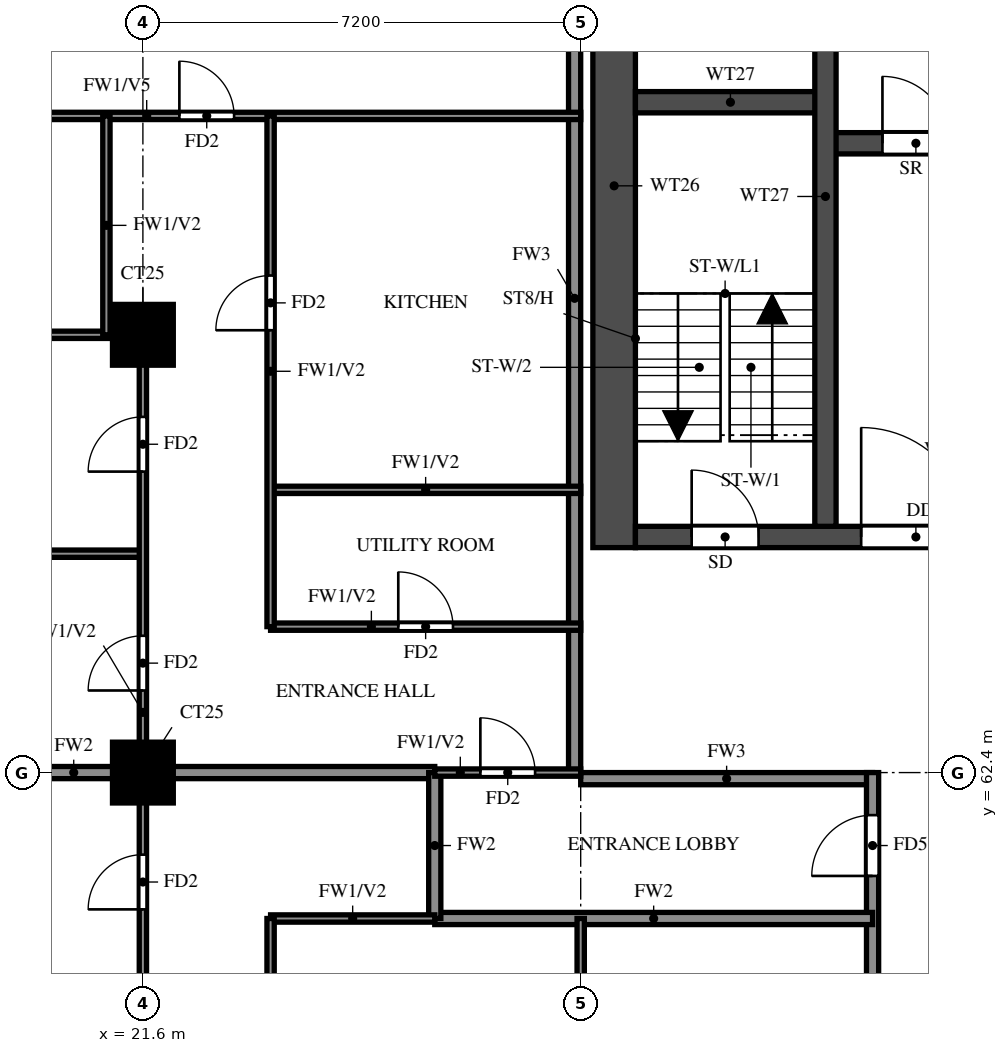
"""IFC4 building model, lengths in metres.
Left out: names, types, materials, properties, quantities, classifications, styles, units other than length and angle.
Written with IfcOpenShell. Run it as: python <this file> out.ifc"""

import sys

from ifc_helpers import new_model, si_unit, direction, frame, frame_2d, origin, origin_2d, place, context, subcontext, project, spatial, rectangle, extrude, source, transform, mapped, element, fill, save


model = new_model("IFC4")
c1 = context("Model", 3, precision=1e-05, world=origin(), true_north=direction((0.0, 1.0)))
c2 = subcontext(c1, "Body", "Model", "MODEL_VIEW")
j1 = project(units=[si_unit("LENGTHUNIT", "METRE"), si_unit("PLANEANGLEUNIT", "RADIAN")], contexts=[c1])
p1 = place(None, origin())
s1 = spatial("IfcSite", under=j1, at=p1, CompositionType="ELEMENT")
p2 = place(p1, origin())
s2 = spatial("IfcBuilding", under=s1, at=p2, CompositionType="ELEMENT")
p3 = place(p2, frame((0.0, 0.0, 143.0)))
s3 = spatial("IfcBuildingStorey", under=s2, at=p3, CompositionType="ELEMENT", Elevation=143.0)
m1 = source(origin(), c2, "Body", "SweptSolid", [
    extrude(rectangle(XDim=1.0, YDim=1.0, at=origin_2d()), origin(), (0.0, 0.0, 1.0), 3.2),
])
for number, where, z_axis, x_axis in (
    (1, (21.6, 62.4, 0.0), (0.0, 0.0, 1.0), (1.0, 0.0, 0.0)),
    (2, (21.6, 69.6, 0.0), (0.0, 0.0, 1.0), (1.0, 0.0, 0.0)),
):
    element("IfcColumn", number, at=place(p3, frame(where, z_axis=z_axis, x_axis=x_axis)), inside=s3, PredefinedType="COLUMN", context=c2, shape_type="MappedRepresentation", body=[
        mapped(m1, transform((0.0, 0.0, 0.0))),
    ])
p4 = place(p3, frame((29.35, 66.1, 0.0), z_axis=(0.0, 0.0, 1.0), x_axis=(0.0, 1.0, 0.0)))
e3 = element("IfcWall", 3, at=p4, inside=s3, PredefinedType="SHEAR", context=c2, shape_type="SweptSolid", body=[
    extrude(rectangle(XDim=11.9, YDim=0.7, at=frame_2d((5.95, 0.0))), origin(), (0.0, 0.0, 1.0), 3.2),
])
p5 = place(p3, frame((29.7, 66.275, 0.0), z_axis=(0.0, 0.0, 1.0), x_axis=(1.0, 0.0, 0.0)))
e4 = element("IfcWall", 4, at=p5, inside=s3, PredefinedType="SHEAR", context=c2, shape_type="SweptSolid", body=[
    extrude(rectangle(XDim=41.4, YDim=0.35, at=frame_2d((20.7, 0.0))), origin(), (0.0, 0.0, 1.0), 3.2),
])
p6 = place(p5, frame((0.925, 0.0, 0.0)))
e5 = element("IfcOpeningElement", 5, at=p6, cuts=e4, PredefinedType="OPENING", context=c2, shape_type="SweptSolid", body=[
    extrude(rectangle(XDim=1.1, YDim=2.1, at=frame_2d((0.55, 1.05))), frame((0.0, 0.185, 0.0), z_axis=(0.0, -1.0, 0.0), x_axis=(1.0, 0.0, 0.0)), (0.0, 0.0, 1.0), 0.37),
])
p7 = place(p5, frame((3.712, 0.0, 0.0)))
e6 = element("IfcOpeningElement", 6, at=p7, cuts=e4, PredefinedType="OPENING", context=c2, shape_type="SweptSolid", body=[
    extrude(rectangle(XDim=1.8, YDim=2.1, at=frame_2d((0.9, 1.05))), frame((0.0, 0.185, 0.0), z_axis=(0.0, -1.0, 0.0), x_axis=(1.0, 0.0, 0.0)), (0.0, 0.0, 1.0), 0.37),
])
p8 = place(p3, frame((32.825, 72.75, 0.0), z_axis=(0.0, 0.0, 1.0), x_axis=(1.0, 0.0, 0.0)))
e7 = element("IfcWall", 7, at=p8, inside=s3, PredefinedType="SHEAR", context=c2, shape_type="SweptSolid", body=[
    extrude(rectangle(XDim=35.15, YDim=0.35, at=frame_2d((17.575, 0.0))), origin(), (0.0, 0.0, 1.0), 3.2),
])
p9 = place(p8, frame((19.8, 0.0, 0.0)))
e8 = element("IfcOpeningElement", 8, at=p9, cuts=e7, PredefinedType="OPENING", context=c2, shape_type="SweptSolid", body=[
    extrude(rectangle(XDim=1.1, YDim=2.1, at=frame_2d((0.55, 1.05))), frame((0.0, 0.185, 0.0), z_axis=(0.0, -1.0, 0.0), x_axis=(1.0, 0.0, 0.0)), (0.0, 0.0, 1.0), 0.37),
])
p10 = place(p8, frame((27.7, 0.0, 0.0)))
e9 = element("IfcOpeningElement", 9, at=p10, cuts=e7, PredefinedType="OPENING", context=c2, shape_type="SweptSolid", body=[
    extrude(rectangle(XDim=1.1, YDim=2.1, at=frame_2d((0.55, 1.05))), frame((0.0, 0.185, 0.0), z_axis=(0.0, -1.0, 0.0), x_axis=(1.0, 0.0, 0.0)), (0.0, 0.0, 1.0), 0.37),
])
p11 = place(p8, frame((30.3, 0.0, 0.0)))
e10 = element("IfcOpeningElement", 10, at=p11, cuts=e7, PredefinedType="OPENING", context=c2, shape_type="SweptSolid", body=[
    extrude(rectangle(XDim=1.1, YDim=2.1, at=frame_2d((0.55, 1.05))), frame((0.0, 0.185, 0.0), z_axis=(0.0, -1.0, 0.0), x_axis=(1.0, 0.0, 0.0)), (0.0, 0.0, 1.0), 0.37),
])
p12 = place(p8, frame((3.8, 0.0, 0.0)))
e11 = element("IfcOpeningElement", 11, at=p12, cuts=e7, PredefinedType="OPENING", context=c2, shape_type="SweptSolid", body=[
    extrude(rectangle(XDim=1.1, YDim=2.1, at=frame_2d((0.55, 1.05))), frame((0.0, 0.185, 0.0), z_axis=(0.0, -1.0, 0.0), x_axis=(1.0, 0.0, 0.0)), (0.0, 0.0, 1.0), 0.37),
])
p13 = place(p8, frame((6.55, 0.0, 0.0)))
e12 = element("IfcOpeningElement", 12, at=p13, cuts=e7, PredefinedType="OPENING", context=c2, shape_type="SweptSolid", body=[
    extrude(rectangle(XDim=1.1, YDim=2.1, at=frame_2d((0.55, 1.05))), frame((0.0, 0.185, 0.0), z_axis=(0.0, -1.0, 0.0), x_axis=(1.0, 0.0, 0.0)), (0.0, 0.0, 1.0), 0.37),
])
p14 = place(p8, frame((9.3, 0.0, 0.0)))
e13 = element("IfcOpeningElement", 13, at=p14, cuts=e7, PredefinedType="OPENING", context=c2, shape_type="SweptSolid", body=[
    extrude(rectangle(XDim=1.1, YDim=2.1, at=frame_2d((0.55, 1.05))), frame((0.0, 0.185, 0.0), z_axis=(0.0, -1.0, 0.0), x_axis=(1.0, 0.0, 0.0)), (0.0, 0.0, 1.0), 0.37),
])
p15 = place(p8, frame((12.05, 0.0, 0.0)))
e14 = element("IfcOpeningElement", 14, at=p15, cuts=e7, PredefinedType="OPENING", context=c2, shape_type="SweptSolid", body=[
    extrude(rectangle(XDim=1.1, YDim=2.1, at=frame_2d((0.55, 1.05))), frame((0.0, 0.185, 0.0), z_axis=(0.0, -1.0, 0.0), x_axis=(1.0, 0.0, 0.0)), (0.0, 0.0, 1.0), 0.37),
])
p16 = place(p8, frame((14.8, 0.0, 0.0)))
e15 = element("IfcOpeningElement", 15, at=p16, cuts=e7, PredefinedType="OPENING", context=c2, shape_type="SweptSolid", body=[
    extrude(rectangle(XDim=1.1, YDim=2.1, at=frame_2d((0.55, 1.05))), frame((0.0, 0.185, 0.0), z_axis=(0.0, -1.0, 0.0), x_axis=(1.0, 0.0, 0.0)), (0.0, 0.0, 1.0), 0.37),
])
p17 = place(p8, frame((17.55, 0.0, 0.0)))
e16 = element("IfcOpeningElement", 16, at=p17, cuts=e7, PredefinedType="OPENING", context=c2, shape_type="SweptSolid", body=[
    extrude(rectangle(XDim=1.1, YDim=2.1, at=frame_2d((0.55, 1.05))), frame((0.0, 0.185, 0.0), z_axis=(0.0, -1.0, 0.0), x_axis=(1.0, 0.0, 0.0)), (0.0, 0.0, 1.0), 0.37),
])
p18 = place(p8, frame((0.938, 0.0, 0.0)))
e17 = element("IfcOpeningElement", 17, at=p18, cuts=e7, PredefinedType="OPENING", context=c2, shape_type="SweptSolid", body=[
    extrude(rectangle(XDim=1.1, YDim=2.1, at=frame_2d((0.55, 1.05))), frame((0.0, 0.185, 0.0), z_axis=(0.0, -1.0, 0.0), x_axis=(1.0, 0.0, 0.0)), (0.0, 0.0, 1.0), 0.37),
])
p19 = place(p3, frame((29.7, 73.425, 0.0), z_axis=(0.0, 0.0, 1.0), x_axis=(1.0, 0.0, 0.0)))
e18 = element("IfcWall", 18, at=p19, inside=s3, PredefinedType="SHEAR", context=c2, shape_type="SweptSolid", body=[
    extrude(rectangle(XDim=3.125, YDim=0.35, at=frame_2d((1.562, 0.0))), origin(), (0.0, 0.0, 1.0), 3.2),
])
p20 = place(p3, frame((32.825, 66.45, 0.0), z_axis=(0.0, 0.0, 1.0), x_axis=(0.0, 1.0, 0.0)))
e19 = element("IfcWall", 19, at=p20, inside=s3, PredefinedType="SHEAR", context=c2, shape_type="SweptSolid", body=[
    extrude(rectangle(XDim=10.85, YDim=0.35, at=frame_2d((5.425, 0.0))), origin(), (0.0, 0.0, 1.0), 3.2),
])
p21 = place(p3, frame((28.8, 62.3, 0.0), z_axis=(0.0, 0.0, 1.0), x_axis=(1.0, 0.0, 0.0)))
e20 = element("IfcWall", 20, at=p21, inside=s3, PredefinedType="SOLIDWALL", context=c2, shape_type="SweptSolid", body=[
    extrude(rectangle(XDim=4.8, YDim=0.2, at=frame_2d((2.4, 0.0))), origin(), (0.0, 0.0, 1.0), 3.2),
])
p22 = place(p3, frame((28.7, 62.4, 0.0), z_axis=(0.0, 0.0, 1.0), x_axis=(0.0, 1.0, 0.0)))
e21 = element("IfcWall", 21, at=p22, inside=s3, PredefinedType="SOLIDWALL", context=c2, shape_type="SweptSolid", body=[
    extrude(rectangle(XDim=15.6, YDim=0.2, at=frame_2d((7.8, 0.0))), origin(), (0.0, 0.0, 1.0), 3.2),
])
p23 = place(p3, frame((33.6, 45.6, 0.0), z_axis=(0.0, 0.0, 1.0), x_axis=(0.0, 1.0, 0.0)))
e22 = element("IfcWall", 22, at=p23, inside=s3, PredefinedType="SOLIDWALL", context=c2, shape_type="SweptSolid", body=[
    extrude(rectangle(XDim=16.8, YDim=0.2, at=frame_2d((8.4, 0.0))), origin(), (0.0, 0.0, 1.0), 3.2),
])
p24 = place(p23, frame((0.7, 0.0, 0.0)))
e23 = element("IfcOpeningElement", 23, at=p24, cuts=e22, PredefinedType="OPENING", context=c2, shape_type="SweptSolid", body=[
    extrude(rectangle(XDim=1.0, YDim=2.1, at=frame_2d((0.5, 1.05))), frame((0.0, 0.11, 0.0), z_axis=(0.0, -1.0, 0.0), x_axis=(1.0, 0.0, 0.0)), (0.0, 0.0, 1.0), 0.22),
])
p25 = place(p23, frame((6.7, 0.0, 0.0)))
e24 = element("IfcOpeningElement", 24, at=p25, cuts=e22, PredefinedType="OPENING", context=c2, shape_type="SweptSolid", body=[
    extrude(rectangle(XDim=1.0, YDim=2.1, at=frame_2d((0.5, 1.05))), frame((0.0, 0.11, 0.0), z_axis=(0.0, -1.0, 0.0), x_axis=(1.0, 0.0, 0.0)), (0.0, 0.0, 1.0), 0.22),
])
p26 = place(p23, frame((15.1, 0.0, 0.0)))
e25 = element("IfcOpeningElement", 25, at=p26, cuts=e22, PredefinedType="OPENING", context=c2, shape_type="SweptSolid", body=[
    extrude(rectangle(XDim=1.0, YDim=2.1, at=frame_2d((0.5, 1.05))), frame((0.0, 0.11, 0.0), z_axis=(0.0, -1.0, 0.0), x_axis=(1.0, 0.0, 0.0)), (0.0, 0.0, 1.0), 0.22),
])
p27 = place(p3, frame((26.4, 60.0, 0.0), z_axis=(0.0, 0.0, 1.0), x_axis=(1.0, 0.0, 0.0)))
e26 = element("IfcWall", 26, at=p27, inside=s3, PredefinedType="SOLIDWALL", context=c2, shape_type="SweptSolid", body=[
    extrude(rectangle(XDim=7.2, YDim=0.2, at=frame_2d((3.6, 0.0))), origin(), (0.0, 0.0, 1.0), 3.2),
])
p28 = place(p3, frame((14.525, 62.4, 0.0), z_axis=(0.0, 0.0, 1.0), x_axis=(1.0, 0.0, 0.0)))
e27 = element("IfcWall", 27, at=p28, inside=s3, PredefinedType="SOLIDWALL", context=c2, shape_type="SweptSolid", body=[
    extrude(rectangle(XDim=11.875, YDim=0.2, at=frame_2d((5.938, 0.0))), origin(), (0.0, 0.0, 1.0), 3.2),
])
p29 = place(p3, frame((26.4, 60.0, 0.0), z_axis=(0.0, 0.0, 1.0), x_axis=(0.0, 1.0, 0.0)))
e28 = element("IfcWall", 28, at=p29, inside=s3, PredefinedType="SOLIDWALL", context=c2, shape_type="SweptSolid", body=[
    extrude(rectangle(XDim=2.4, YDim=0.2, at=frame_2d((1.2, 0.0))), origin(), (0.0, 0.0, 1.0), 3.2),
])
p30 = place(p3, frame((23.7, 60.0, 0.0), z_axis=(0.0, 0.0, 1.0), x_axis=(1.0, 0.0, 0.0)))
e29 = element("IfcWall", 29, at=p30, inside=s3, PredefinedType="PARTITIONING", context=c2, shape_type="SweptSolid", body=[
    extrude(rectangle(XDim=2.7, YDim=0.12, at=frame_2d((1.35, 0.0))), origin(), (0.0, 0.0, 1.0), 3.2),
])
p31 = place(p3, frame((26.4, 62.4, 0.0), z_axis=(0.0, 0.0, 1.0), x_axis=(1.0, 0.0, 0.0)))
e30 = element("IfcWall", 30, at=p31, inside=s3, PredefinedType="PARTITIONING", context=c2, shape_type="SweptSolid", body=[
    extrude(rectangle(XDim=2.4, YDim=0.12, at=frame_2d((1.2, 0.0))), origin(), (0.0, 0.0, 1.0), 3.2),
])
p32 = place(p31, frame((0.75, 0.0, 0.0)))
e31 = element("IfcOpeningElement", 31, at=p32, cuts=e30, PredefinedType="OPENING", context=c2, shape_type="SweptSolid", body=[
    extrude(rectangle(XDim=0.9, YDim=2.1, at=frame_2d((0.45, 1.05))), frame((0.0, 0.07, 0.0), z_axis=(0.0, -1.0, 0.0), x_axis=(1.0, 0.0, 0.0)), (0.0, 0.0, 1.0), 0.14),
])
p33 = place(p3, frame((23.7, 64.8, 0.0), z_axis=(0.0, 0.0, 1.0), x_axis=(1.0, 0.0, 0.0)))
e32 = element("IfcWall", 32, at=p33, inside=s3, PredefinedType="PARTITIONING", context=c2, shape_type="SweptSolid", body=[
    extrude(rectangle(XDim=5.1, YDim=0.12, at=frame_2d((2.55, 0.0))), origin(), (0.0, 0.0, 1.0), 3.2),
])
p34 = place(p33, frame((2.1, 0.0, 0.0)))
e33 = element("IfcOpeningElement", 33, at=p34, cuts=e32, PredefinedType="OPENING", context=c2, shape_type="SweptSolid", body=[
    extrude(rectangle(XDim=0.9, YDim=2.1, at=frame_2d((0.45, 1.05))), frame((0.0, 0.07, 0.0), z_axis=(0.0, -1.0, 0.0), x_axis=(1.0, 0.0, 0.0)), (0.0, 0.0, 1.0), 0.14),
])
p35 = place(p3, frame((14.525, 66.0, 0.0), z_axis=(0.0, 0.0, 1.0), x_axis=(1.0, 0.0, 0.0)))
e34 = element("IfcWall", 34, at=p35, inside=s3, PredefinedType="PARTITIONING", context=c2, shape_type="SweptSolid", body=[
    extrude(rectangle(XDim=7.075, YDim=0.12, at=frame_2d((3.538, 0.0))), origin(), (0.0, 0.0, 1.0), 2.3),
])
p36 = place(p3, frame((23.7, 67.05, 0.0), z_axis=(0.0, 0.0, 1.0), x_axis=(1.0, 0.0, 0.0)))
e35 = element("IfcWall", 35, at=p36, inside=s3, PredefinedType="PARTITIONING", context=c2, shape_type="SweptSolid", body=[
    extrude(rectangle(XDim=5.1, YDim=0.12, at=frame_2d((2.55, 0.0))), origin(), (0.0, 0.0, 1.0), 3.2),
])
p37 = place(p3, frame((14.525, 69.6, 0.0), z_axis=(0.0, 0.0, 1.0), x_axis=(1.0, 0.0, 0.0)))
e36 = element("IfcWall", 36, at=p37, inside=s3, PredefinedType="PARTITIONING", context=c2, shape_type="SweptSolid", body=[
    extrude(rectangle(XDim=7.075, YDim=0.12, at=frame_2d((3.538, 0.0))), origin(), (0.0, 0.0, 1.0), 3.2),
])
p38 = place(p37, frame((2.837, 0.0, 0.0)))
e37 = element("IfcOpeningElement", 37, at=p38, cuts=e36, PredefinedType="OPENING", context=c2, shape_type="SweptSolid", body=[
    extrude(rectangle(XDim=0.8, YDim=2.1, at=frame_2d((0.4, 1.05))), frame((0.0, 0.07, 0.0), z_axis=(0.0, -1.0, 0.0), x_axis=(1.0, 0.0, 0.0)), (0.0, 0.0, 1.0), 0.14),
])
p39 = place(p3, frame((14.525, 73.2, 0.0), z_axis=(0.0, 0.0, 1.0), x_axis=(1.0, 0.0, 0.0)))
e38 = element("IfcWall", 38, at=p39, inside=s3, PredefinedType="PARTITIONING", context=c2, shape_type="SweptSolid", body=[
    extrude(rectangle(XDim=14.275, YDim=0.12, at=frame_2d((7.138, 0.0))), origin(), (0.0, 0.0, 1.0), 2.3),
])
p40 = place(p39, frame((7.675, 0.0, 0.0)))
e39 = element("IfcOpeningElement", 39, at=p40, cuts=e38, PredefinedType="OPENING", context=c2, shape_type="SweptSolid", body=[
    extrude(rectangle(XDim=0.9, YDim=2.1, at=frame_2d((0.45, 1.05))), frame((0.0, 0.07, 0.0), z_axis=(0.0, -1.0, 0.0), x_axis=(1.0, 0.0, 0.0)), (0.0, 0.0, 1.0), 0.14),
])
p41 = place(p3, frame((21.0, 69.6, 0.0), z_axis=(0.0, 0.0, 1.0), x_axis=(0.0, 1.0, 0.0)))
e40 = element("IfcWall", 40, at=p41, inside=s3, PredefinedType="PARTITIONING", context=c2, shape_type="SweptSolid", body=[
    extrude(rectangle(XDim=3.6, YDim=0.12, at=frame_2d((1.8, 0.0))), origin(), (0.0, 0.0, 1.0), 3.2),
])
p42 = place(p3, frame((21.6, 58.8, 0.0), z_axis=(0.0, 0.0, 1.0), x_axis=(0.0, 1.0, 0.0)))
e41 = element("IfcWall", 41, at=p42, inside=s3, PredefinedType="PARTITIONING", context=c2, shape_type="SweptSolid", body=[
    extrude(rectangle(XDim=10.8, YDim=0.12, at=frame_2d((5.4, 0.0))), origin(), (0.0, 0.0, 1.0), 3.2),
])
p43 = place(p42, frame((1.35, 0.0, 0.0)))
e42 = element("IfcOpeningElement", 42, at=p43, cuts=e41, PredefinedType="OPENING", context=c2, shape_type="SweptSolid", body=[
    extrude(rectangle(XDim=0.9, YDim=2.1, at=frame_2d((0.45, 1.05))), frame((0.0, 0.07, 0.0), z_axis=(0.0, -1.0, 0.0), x_axis=(1.0, 0.0, 0.0)), (0.0, 0.0, 1.0), 0.14),
])
p44 = place(p42, frame((4.95, 0.0, 0.0)))
e43 = element("IfcOpeningElement", 43, at=p44, cuts=e41, PredefinedType="OPENING", context=c2, shape_type="SweptSolid", body=[
    extrude(rectangle(XDim=0.9, YDim=2.1, at=frame_2d((0.45, 1.05))), frame((0.0, 0.07, 0.0), z_axis=(0.0, -1.0, 0.0), x_axis=(1.0, 0.0, 0.0)), (0.0, 0.0, 1.0), 0.14),
])
p45 = place(p42, frame((8.55, 0.0, 0.0)))
e44 = element("IfcOpeningElement", 44, at=p45, cuts=e41, PredefinedType="OPENING", context=c2, shape_type="SweptSolid", body=[
    extrude(rectangle(XDim=0.9, YDim=2.1, at=frame_2d((0.45, 1.05))), frame((0.0, 0.07, 0.0), z_axis=(0.0, -1.0, 0.0), x_axis=(1.0, 0.0, 0.0)), (0.0, 0.0, 1.0), 0.14),
])
p46 = place(p3, frame((23.7, 54.0, 0.0), z_axis=(0.0, 0.0, 1.0), x_axis=(0.0, 1.0, 0.0)))
e45 = element("IfcWall", 45, at=p46, inside=s3, PredefinedType="PARTITIONING", context=c2, shape_type="SweptSolid", body=[
    extrude(rectangle(XDim=6.0, YDim=0.12, at=frame_2d((3.0, 0.0))), origin(), (0.0, 0.0, 1.0), 3.2),
])
p47 = place(p46, frame((3.65, 0.0, 0.0)))
e46 = element("IfcOpeningElement", 46, at=p47, cuts=e45, PredefinedType="OPENING", context=c2, shape_type="SweptSolid", body=[
    extrude(rectangle(XDim=0.8, YDim=2.1, at=frame_2d((0.4, 1.05))), frame((0.0, 0.07, 0.0), z_axis=(0.0, -1.0, 0.0), x_axis=(1.0, 0.0, 0.0)), (0.0, 0.0, 1.0), 0.14),
])
p48 = place(p3, frame((23.7, 64.8, 0.0), z_axis=(0.0, 0.0, 1.0), x_axis=(0.0, 1.0, 0.0)))
e47 = element("IfcWall", 47, at=p48, inside=s3, PredefinedType="PARTITIONING", context=c2, shape_type="SweptSolid", body=[
    extrude(rectangle(XDim=8.4, YDim=0.12, at=frame_2d((4.2, 0.0))), origin(), (0.0, 0.0, 1.0), 3.2),
])
p49 = place(p48, frame((4.875, 0.0, 0.0)))
e48 = element("IfcOpeningElement", 48, at=p49, cuts=e47, PredefinedType="OPENING", context=c2, shape_type="SweptSolid", body=[
    extrude(rectangle(XDim=0.9, YDim=2.1, at=frame_2d((0.45, 1.05))), frame((0.0, 0.07, 0.0), z_axis=(0.0, -1.0, 0.0), x_axis=(1.0, 0.0, 0.0)), (0.0, 0.0, 1.0), 0.14),
])
p50 = place(p3, frame((28.8, 54.0, 0.0), z_axis=(0.0, 0.0, 1.0), x_axis=(0.0, 1.0, 0.0)))
e49 = element("IfcWall", 49, at=p50, inside=s3, PredefinedType="PARTITIONING", context=c2, shape_type="SweptSolid", body=[
    extrude(rectangle(XDim=6.0, YDim=0.12, at=frame_2d((3.0, 0.0))), origin(), (0.0, 0.0, 1.0), 3.2),
])
p51 = place(p6, origin())
e50 = element("IfcDoor", 50, at=p51, inside=s3, OperationType="SINGLE_SWING_LEFT", PredefinedType="DOOR", context=c2, shape_type="SweptSolid", body=[
    extrude(rectangle(XDim=1.1, YDim=2.1, at=frame_2d((0.55, 1.05))), frame((0.0, 0.025, 0.0), z_axis=(0.0, -1.0, 0.0), x_axis=(1.0, 0.0, 0.0)), (0.0, 0.0, 1.0), 0.05),
])
fill(e5, e50)
p52 = place(p7, origin())
e51 = element("IfcDoor", 51, at=p52, inside=s3, OperationType="DOUBLE_DOOR_SINGLE_SWING", PredefinedType="DOOR", context=c2, shape_type="SweptSolid", body=[
    extrude(rectangle(XDim=1.8, YDim=2.1, at=frame_2d((0.9, 1.05))), frame((0.0, 0.025, 0.0), z_axis=(0.0, -1.0, 0.0), x_axis=(1.0, 0.0, 0.0)), (0.0, 0.0, 1.0), 0.05),
])
fill(e6, e51)
p53 = place(p18, origin())
e52 = element("IfcDoor", 52, at=p53, inside=s3, OperationType="SINGLE_SWING_LEFT", PredefinedType="DOOR", context=c2, shape_type="SweptSolid", body=[
    extrude(rectangle(XDim=1.1, YDim=2.1, at=frame_2d((0.55, 1.05))), frame((0.0, 0.025, 0.0), z_axis=(0.0, -1.0, 0.0), x_axis=(1.0, 0.0, 0.0)), (0.0, 0.0, 1.0), 0.05),
])
fill(e17, e52)
p54 = place(p43, origin())
e53 = element("IfcDoor", 53, at=p54, inside=s3, OperationType="SINGLE_SWING_RIGHT", PredefinedType="DOOR", context=c2, shape_type="SweptSolid", body=[
    extrude(rectangle(XDim=0.9, YDim=2.1, at=frame_2d((0.45, 1.05))), frame((0.0, 0.025, 0.0), z_axis=(0.0, -1.0, 0.0), x_axis=(1.0, 0.0, 0.0)), (0.0, 0.0, 1.0), 0.05),
])
fill(e42, e53)
p55 = place(p32, origin())
e54 = element("IfcDoor", 54, at=p55, inside=s3, OperationType="SINGLE_SWING_LEFT", PredefinedType="DOOR", context=c2, shape_type="SweptSolid", body=[
    extrude(rectangle(XDim=0.9, YDim=2.1, at=frame_2d((0.45, 1.05))), frame((0.0, 0.025, 0.0), z_axis=(0.0, -1.0, 0.0), x_axis=(1.0, 0.0, 0.0)), (0.0, 0.0, 1.0), 0.05),
])
fill(e31, e54)
p56 = place(p26, origin())
e55 = element("IfcDoor", 55, at=p56, inside=s3, OperationType="SINGLE_SWING_LEFT", PredefinedType="DOOR", context=c2, shape_type="SweptSolid", body=[
    extrude(rectangle(XDim=1.0, YDim=2.1, at=frame_2d((0.5, 1.05))), frame((0.0, 0.025, 0.0), z_axis=(0.0, -1.0, 0.0), x_axis=(1.0, 0.0, 0.0)), (0.0, 0.0, 1.0), 0.05),
])
fill(e25, e55)
p57 = place(p44, origin())
e56 = element("IfcDoor", 56, at=p57, inside=s3, OperationType="SINGLE_SWING_RIGHT", PredefinedType="DOOR", context=c2, shape_type="SweptSolid", body=[
    extrude(rectangle(XDim=0.9, YDim=2.1, at=frame_2d((0.45, 1.05))), frame((0.0, 0.025, 0.0), z_axis=(0.0, -1.0, 0.0), x_axis=(1.0, 0.0, 0.0)), (0.0, 0.0, 1.0), 0.05),
])
fill(e43, e56)
p58 = place(p45, origin())
e57 = element("IfcDoor", 57, at=p58, inside=s3, OperationType="SINGLE_SWING_LEFT", PredefinedType="DOOR", context=c2, shape_type="SweptSolid", body=[
    extrude(rectangle(XDim=0.9, YDim=2.1, at=frame_2d((0.45, 1.05))), frame((0.0, 0.025, 0.0), z_axis=(0.0, -1.0, 0.0), x_axis=(1.0, 0.0, 0.0)), (0.0, 0.0, 1.0), 0.05),
])
fill(e44, e57)
p59 = place(p40, origin())
e58 = element("IfcDoor", 58, at=p59, inside=s3, OperationType="SINGLE_SWING_RIGHT", PredefinedType="DOOR", context=c2, shape_type="SweptSolid", body=[
    extrude(rectangle(XDim=0.9, YDim=2.1, at=frame_2d((0.45, 1.05))), frame((0.0, 0.025, 0.0), z_axis=(0.0, -1.0, 0.0), x_axis=(1.0, 0.0, 0.0)), (0.0, 0.0, 1.0), 0.05),
])
fill(e39, e58)
p60 = place(p34, origin())
e59 = element("IfcDoor", 59, at=p60, inside=s3, OperationType="SINGLE_SWING_LEFT", PredefinedType="DOOR", context=c2, shape_type="SweptSolid", body=[
    extrude(rectangle(XDim=0.9, YDim=2.1, at=frame_2d((0.45, 1.05))), frame((0.0, 0.025, 0.0), z_axis=(0.0, -1.0, 0.0), x_axis=(1.0, 0.0, 0.0)), (0.0, 0.0, 1.0), 0.05),
])
fill(e33, e59)
p61 = place(p49, origin())
e60 = element("IfcDoor", 60, at=p61, inside=s3, OperationType="SINGLE_SWING_LEFT", PredefinedType="DOOR", context=c2, shape_type="SweptSolid", body=[
    extrude(rectangle(XDim=0.9, YDim=2.1, at=frame_2d((0.45, 1.05))), frame((0.0, 0.025, 0.0), z_axis=(0.0, -1.0, 0.0), x_axis=(1.0, 0.0, 0.0)), (0.0, 0.0, 1.0), 0.05),
])
fill(e48, e60)
save(model, sys.argv[1])
